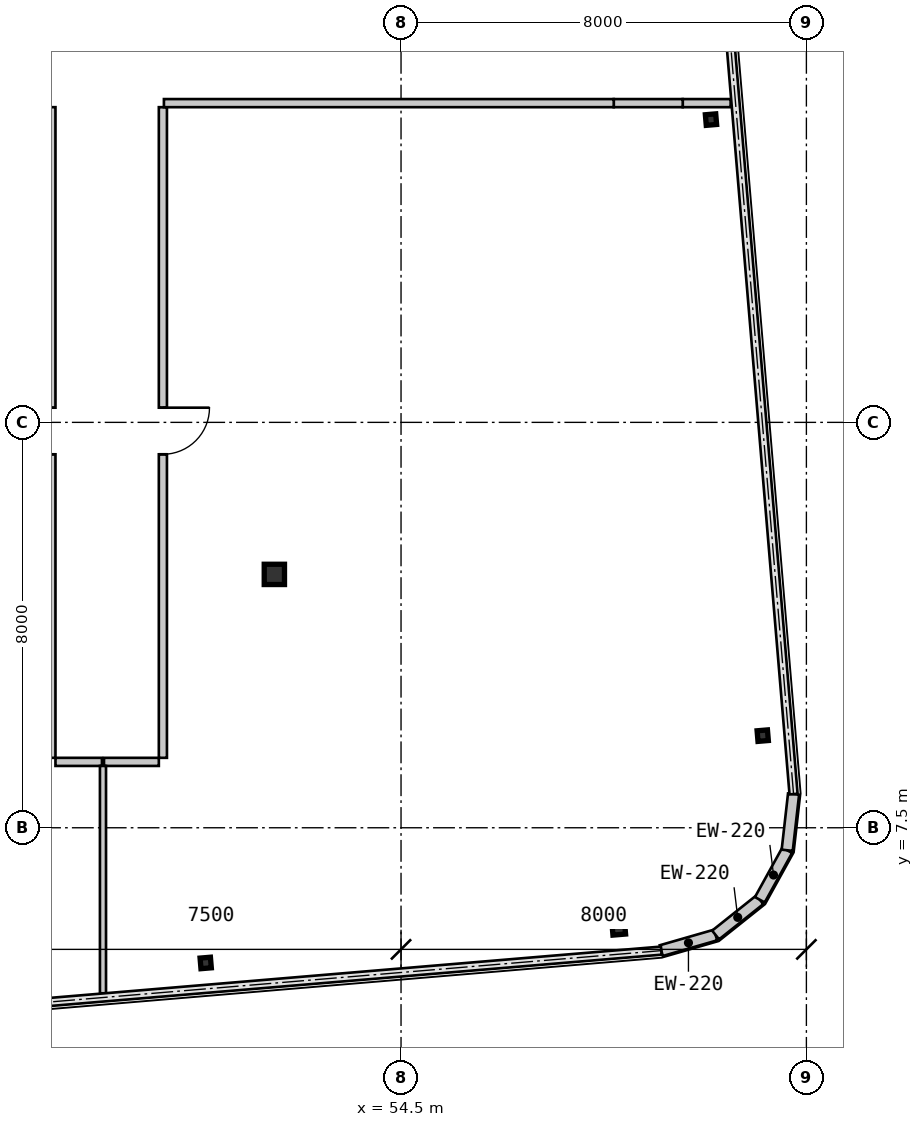
"""IFC4 building model, lengths in metres.
Left out: names, types, materials, properties, quantities, classifications, styles, units other than length and angle.
Written with IfcOpenShell. Run it as: python <this file> out.ifc"""

import sys

from ifc_helpers import new_model, si_unit, direction, frame, frame_2d, origin, origin_2d, place, context, subcontext, project, spatial, rectangle, hollow_rectangle, i_section, extrude, source, transform, mapped, element, fill, save


model = new_model("IFC4")
c1 = context("Model", 3, precision=1e-05, world=origin(), true_north=direction((0.0, 1.0)))
c2 = subcontext(c1, "Body", "Model", "MODEL_VIEW")
j1 = project(units=[si_unit("LENGTHUNIT", "METRE"), si_unit("PLANEANGLEUNIT", "RADIAN")], contexts=[c1])
p1 = place(None, origin())
s1 = spatial("IfcSite", under=j1, at=p1, CompositionType="ELEMENT")
p2 = place(p1, origin())
s2 = spatial("IfcBuilding", under=s1, at=p2, CompositionType="ELEMENT")
p3 = place(p2, frame((0.0, 0.0, 197.75)))
s3 = spatial("IfcBuildingStorey", under=s2, at=p3, CompositionType="ELEMENT", Elevation=197.75)
m1 = source(origin(), c2, "Body", "SweptSolid", [
    extrude(hollow_rectangle(XDim=0.4, YDim=0.4, WallThickness=0.016, at=origin_2d()), origin(), (0.0, 0.0, 1.0), 3.15),
])
p4 = place(p3, frame((52.0, 12.5, 0.0), z_axis=(0.0, 0.0, 1.0), x_axis=(1.0, 0.0, 0.0)))
e1 = element("IfcColumn", 1, at=p4, inside=s3, PredefinedType="COLUMN", context=c2, shape_type="MappedRepresentation", body=[
    mapped(m1, transform((0.0, 0.0, 0.0), scale=1.0)),
])
m2 = source(origin(), c2, "Body", "SweptSolid", [
    extrude(i_section(OverallWidth=0.205, OverallDepth=0.21, WebThickness=0.009, FlangeThickness=0.014, at=origin_2d()), origin(), (0.0, 0.0, 1.0), 3.15),
])
p5 = place(p3, frame((50.645, 4.832, 0.0), z_axis=(0.0, 0.0, 1.0), x_axis=(0.99649285925, 0.083677843332, 0.0)))
e2 = element("IfcColumn", 2, at=p5, inside=s3, PredefinedType="COLUMN", context=c2, shape_type="MappedRepresentation", body=[
    mapped(m2, transform((0.0, 0.0, 0.0), scale=1.0)),
])
m3 = source(origin(), c2, "Body", "SweptSolid", [
    extrude(hollow_rectangle(XDim=0.25, YDim=0.25, WallThickness=0.01, at=origin_2d()), origin(), (0.0, 0.0, 1.0), 3.15),
])
p6 = place(p3, frame((58.796, 5.516, 0.0), z_axis=(0.0, 0.0, 1.0), x_axis=(0.99649285925, 0.083677843332, 0.0)))
e3 = element("IfcColumn", 3, at=p6, inside=s3, PredefinedType="COLUMN", context=c2, shape_type="MappedRepresentation", body=[
    mapped(m3, transform((0.0, 0.0, 0.0), scale=1.0)),
])
for number, where, z_axis, x_axis in (
    (4, (61.638, 9.318, 0.0), (0.0, 0.0, 1.0), (0.996, 0.084, 0.0)),
    (5, (60.617, 21.475, 0.0), (0.0, 0.0, 1.0), (0.996, 0.084, 0.0)),
):
    element("IfcColumn", number, at=place(p3, frame(where, z_axis=z_axis, x_axis=x_axis)), inside=s3, PredefinedType="COLUMN", context=c2, shape_type="MappedRepresentation", body=[
        mapped(m2, transform((0.0, 0.0, 0.0), scale=1.0)),
    ])
m4 = source(origin(), c2, "Body", "SweptSolid", [
    extrude(rectangle(XDim=1.116, YDim=0.22, at=frame_2d((0.558, 0.0))), origin(), (0.0, 0.0, 1.0), 2.93),
])
for number, where, z_axis, x_axis in (
    (6, (59.636, 5.075, 0.0), (0.0, 0.0, 1.0), (0.961, 0.277, 0.0)),
    (7, (60.708, 5.384, 0.0), (0.0, 0.0, 1.0), (0.782, 0.623, 0.0)),
    (8, (61.581, 6.079, 0.0), (0.0, 0.0, 1.0), (0.484, 0.875, 0.0)),
    (9, (62.121, 7.056, 0.0), (0.0, 0.0, 1.0), (0.112, 0.994, 0.0)),
):
    element("IfcWall", number, at=place(p3, frame(where, z_axis=z_axis, x_axis=x_axis)), inside=s3, PredefinedType="SOLIDWALL", context=c2, shape_type="MappedRepresentation", body=[
        mapped(m4, transform((0.0, 0.0, 0.0), scale=1.0)),
    ])
m5 = source(origin(), c2, "Body", "SweptSolid", [
    extrude(rectangle(XDim=12.84, YDim=0.16, at=frame_2d((6.42, 0.0))), origin(), (0.0, 0.0, 1.0), 2.93),
])
p7 = place(p3, frame((47.6, 8.88, 0.0), z_axis=(0.0, 0.0, 1.0), x_axis=(0.0, 1.0, 0.0)))
e10 = element("IfcWall", 10, at=p7, inside=s3, PredefinedType="PARTITIONING", context=c2, shape_type="MappedRepresentation", body=[
    mapped(m5, transform((0.0, 0.0, 0.0), scale=1.0)),
])
m6 = source(origin(), c2, "Body", "SweptSolid", [
    extrude(rectangle(XDim=0.92, YDim=2.1, at=frame_2d((0.46, 1.05))), frame((0.0, 0.09, 0.0), z_axis=(0.0, -1.0, 0.0), x_axis=(1.0, 0.0, 0.0)), (0.0, 0.0, 1.0), 0.18),
])
p8 = place(p7, frame((5.99, 0.0, 0.0)))
e11 = element("IfcOpeningElement", 11, at=p8, cuts=e10, PredefinedType="OPENING", context=c2, shape_type="MappedRepresentation", body=[
    mapped(m6, transform((0.0, 0.0, 0.0), scale=1.0)),
])
m7 = source(origin(), c2, "Body", "SweptSolid", [
    extrude(rectangle(XDim=0.917, YDim=0.16, at=frame_2d((0.459, 0.0))), origin(), (0.0, 0.0, 1.0), 2.93),
])
p9 = place(p3, frame((48.597, 8.8, 0.0), z_axis=(0.0, 0.0, 1.0), x_axis=(-1.0, 0.0, 0.0)))
e12 = element("IfcWall", 12, at=p9, inside=s3, PredefinedType="PARTITIONING", context=c2, shape_type="MappedRepresentation", body=[
    mapped(m7, transform((0.0, 0.0, 0.0), scale=1.0)),
])
p10 = place(p3, frame((49.8, 21.72, 0.0), z_axis=(0.0, 0.0, 1.0), x_axis=(0.0, -1.0, 0.0)))
e13 = element("IfcWall", 13, at=p10, inside=s3, PredefinedType="PARTITIONING", context=c2, shape_type="MappedRepresentation", body=[
    mapped(m5, transform((0.0, 0.0, 0.0), scale=1.0)),
])
p11 = place(p10, frame((5.93, 0.0, 0.0)))
e14 = element("IfcOpeningElement", 14, at=p11, cuts=e13, PredefinedType="OPENING", context=c2, shape_type="MappedRepresentation", body=[
    mapped(m6, transform((0.0, 0.0, 0.0), scale=1.0)),
])
m8 = source(origin(), c2, "Body", "SweptSolid", [
    extrude(rectangle(XDim=0.945, YDim=0.16, at=frame_2d((0.473, 0.0))), origin(), (0.0, 0.0, 1.0), 2.93),
])
p12 = place(p3, frame((61.005, 21.8, 0.0), z_axis=(0.0, 0.0, 1.0), x_axis=(-1.0, 0.0, 0.0)))
e15 = element("IfcWall", 15, at=p12, inside=s3, PredefinedType="PARTITIONING", context=c2, shape_type="MappedRepresentation", body=[
    mapped(m8, transform((0.0, 0.0, 0.0), scale=1.0)),
])
m9 = source(origin(), c2, "Body", "SweptSolid", [
    extrude(rectangle(XDim=1.361, YDim=0.16, at=frame_2d((0.681, 0.0))), origin(), (0.0, 0.0, 1.0), 2.47),
])
p13 = place(p3, frame((60.059, 21.8, 0.0), z_axis=(0.0, 0.0, 1.0), x_axis=(-1.0, 0.0, 0.0)))
e16 = element("IfcWall", 16, at=p13, inside=s3, PredefinedType="PARTITIONING", context=c2, shape_type="MappedRepresentation", body=[
    mapped(m9, transform((0.0, 0.0, 0.0), scale=1.0)),
])
m10 = source(origin(), c2, "Body", "SweptSolid", [
    extrude(rectangle(XDim=8.878, YDim=0.16, at=frame_2d((4.439, 0.0))), origin(), (0.0, 0.0, 1.0), 2.93),
])
p14 = place(p3, frame((58.698, 21.8, 0.0), z_axis=(0.0, 0.0, 1.0), x_axis=(-1.0, 0.0, 0.0)))
e17 = element("IfcWall", 17, at=p14, inside=s3, PredefinedType="PARTITIONING", context=c2, shape_type="MappedRepresentation", body=[
    mapped(m10, transform((0.0, 0.0, 0.0), scale=1.0)),
])
m11 = source(origin(), c2, "Body", "SweptSolid", [
    extrude(rectangle(XDim=1.082, YDim=0.16, at=frame_2d((0.541, 0.0))), origin(), (0.0, 0.0, 1.0), 2.93),
])
p15 = place(p3, frame((49.72, 8.8, 0.0), z_axis=(0.0, 0.0, 1.0), x_axis=(-1.0, 0.0, 0.0)))
e18 = element("IfcWall", 18, at=p15, inside=s3, PredefinedType="PARTITIONING", context=c2, shape_type="MappedRepresentation", body=[
    mapped(m11, transform((0.0, 0.0, 0.0), scale=1.0)),
])
m12 = source(origin(), c2, "Body", "SweptSolid", [
    extrude(rectangle(XDim=4.487, YDim=0.12, at=frame_2d((2.243, 0.0))), origin(), (0.0, 0.0, 1.0), 2.93),
])
p16 = place(p3, frame((48.618, 8.72, 0.0), z_axis=(0.0, 0.0, 1.0), x_axis=(0.0, -1.0, 0.0)))
e19 = element("IfcWall", 19, at=p16, inside=s3, PredefinedType="PARTITIONING", context=c2, shape_type="MappedRepresentation", body=[
    mapped(m12, transform((0.0, 0.0, 0.0), scale=1.0)),
])
m13 = source(origin(), c2, "Body", "SweptSolid", [
    extrude(rectangle(XDim=0.92, YDim=2.1, at=frame_2d((0.46, 1.05))), frame((0.0, 0.025, 0.0), z_axis=(0.0, -1.0, 0.0), x_axis=(1.0, 0.0, 0.0)), (0.0, 0.0, 1.0), 0.05),
])
p17 = place(p8, origin())
e20 = element("IfcDoor", 20, at=p17, inside=s3, OperationType="SINGLE_SWING_RIGHT", PredefinedType="DOOR", context=c2, shape_type="MappedRepresentation", body=[
    mapped(m13, transform((0.0, 0.0, 0.0), scale=1.0)),
])
fill(e11, e20)
p18 = place(p11, origin())
e21 = element("IfcDoor", 21, at=p18, inside=s3, OperationType="SINGLE_SWING_LEFT", PredefinedType="DOOR", context=c2, shape_type="MappedRepresentation", body=[
    mapped(m13, transform((0.0, 0.0, 0.0), scale=1.0)),
])
fill(e14, e21)
save(model, sys.argv[1])
